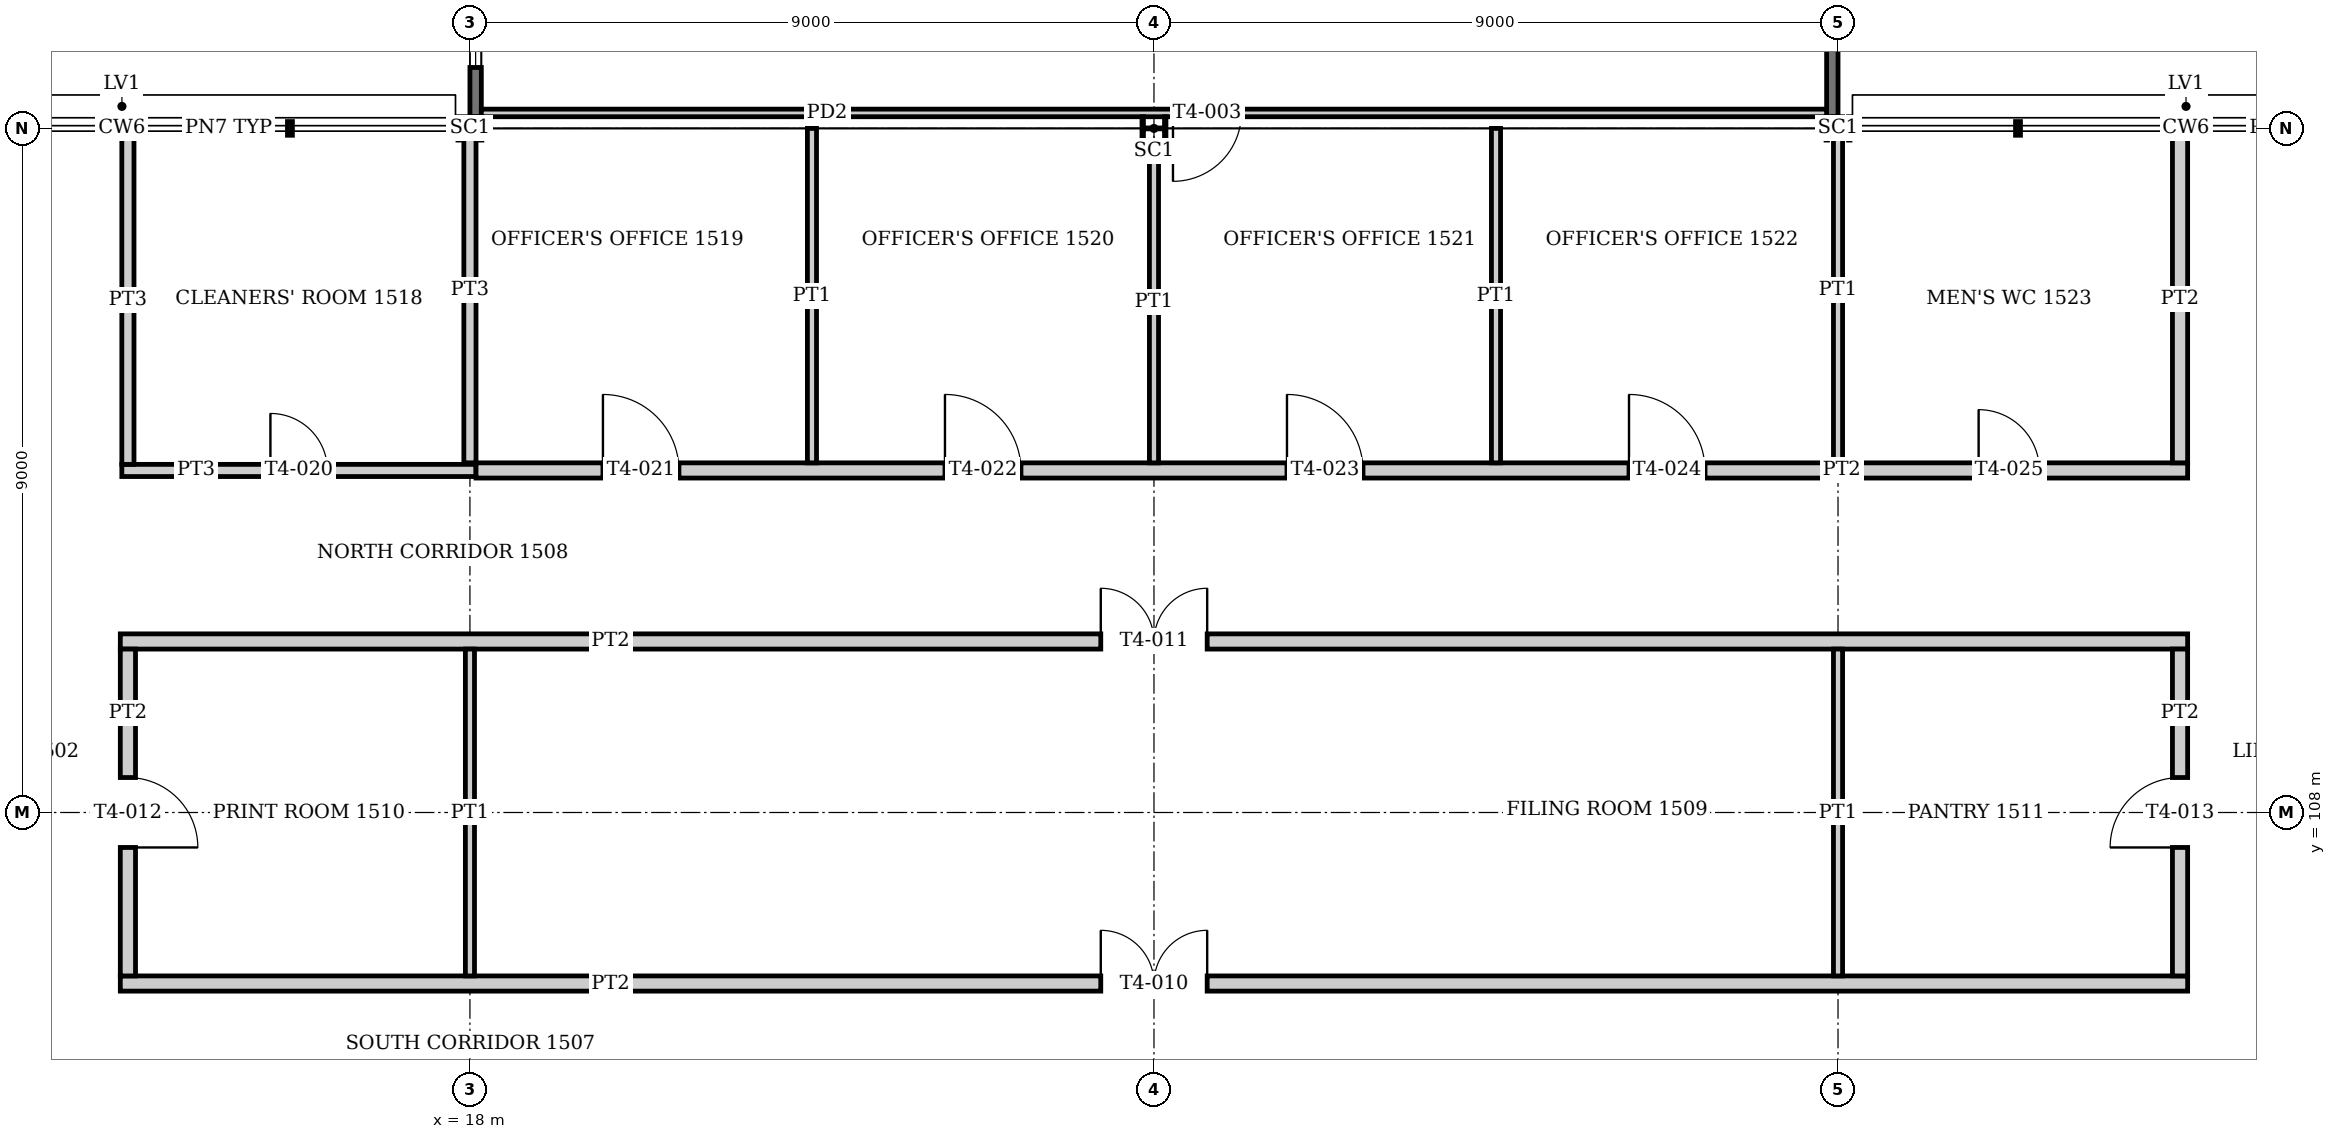
"""IFC4 building model, lengths in metres.
Left out: names, types, materials, properties, quantities, classifications, styles, units other than length and angle.
Written with IfcOpenShell. Run it as: python <this file> out.ifc"""

import sys

from ifc_helpers import new_model, si_unit, direction, frame, frame_2d, origin, origin_2d, place, context, subcontext, project, spatial, rectangle, i_section, extrude, element, fill, save


model = new_model("IFC4")
c1 = context("Model", 3, precision=1e-05, world=origin(), true_north=direction((0.0, 1.0)))
c2 = subcontext(c1, "Body", "Model", "MODEL_VIEW")
j1 = project(units=[si_unit("LENGTHUNIT", "METRE"), si_unit("PLANEANGLEUNIT", "RADIAN")], contexts=[c1])
p1 = place(None, origin())
s1 = spatial("IfcSite", under=j1, at=p1, CompositionType="ELEMENT")
p2 = place(p1, origin())
s2 = spatial("IfcBuilding", under=s1, at=p2, CompositionType="ELEMENT")
p3 = place(p2, frame((0.0, 0.0, 63.2)))
s3 = spatial("IfcBuildingStorey", under=s2, at=p3, CompositionType="ELEMENT", Elevation=63.2)
for number, where, z_axis, x_axis in (
    (1, (18.0, 117.0, 0.0), (0.0, 0.0, 1.0), (0.0, 1.0, 0.0)),
    (2, (27.0, 117.0, 0.0), (0.0, 0.0, 1.0), (0.0, 1.0, 0.0)),
    (3, (36.0, 117.0, 0.0), (0.0, 0.0, 1.0), (0.0, 1.0, 0.0)),
):
    element("IfcColumn", number, at=place(p3, frame(where, z_axis=z_axis, x_axis=x_axis)), inside=s3, PredefinedType="COLUMN", context=c2, shape_type="SweptSolid", body=[
        extrude(i_section(OverallWidth=0.307, OverallDepth=0.315, WebThickness=0.012, FlangeThickness=0.019, at=origin_2d()), origin(), (0.0, 0.0, 1.0), 4.0),
    ])
p4 = place(p3, frame((18.075, 120.45, -0.15), z_axis=(0.0, 0.0, 1.0), x_axis=(0.0, -1.0, 0.0)))
e4 = element("IfcWall", 4, at=p4, inside=s3, PredefinedType="SOLIDWALL", context=c2, shape_type="SweptSolid", body=[
    extrude(rectangle(XDim=3.296, YDim=0.15, at=frame_2d((1.648, 0.0))), origin(), (0.0, 0.0, 1.0), 2.75),
])
p5 = place(p4, frame((0.648, 0.0, 1.05)))
e5 = element("IfcOpeningElement", 5, at=p5, cuts=e4, PredefinedType="OPENING", context=c2, shape_type="SweptSolid", body=[
    extrude(rectangle(XDim=2.0, YDim=1.4, at=frame_2d((1.0, 0.7))), frame((0.0, 0.085, 0.0), z_axis=(0.0, -1.0, 0.0), x_axis=(1.0, 0.0, 0.0)), (0.0, 0.0, 1.0), 0.17),
])
p6 = place(p3, frame((35.925, 120.45, -0.15), z_axis=(0.0, 0.0, 1.0), x_axis=(0.0, -1.0, 0.0)))
e6 = element("IfcWall", 6, at=p6, inside=s3, PredefinedType="SOLIDWALL", context=c2, shape_type="SweptSolid", body=[
    extrude(rectangle(XDim=3.296, YDim=0.15, at=frame_2d((1.648, 0.0))), origin(), (0.0, 0.0, 1.0), 2.75),
])
p7 = place(p3, frame((18.15, 117.204, 0.0), z_axis=(0.0, 0.0, 1.0), x_axis=(1.0, 0.0, 0.0)))
e7 = element("IfcWall", 7, at=p7, inside=s3, PredefinedType="PARTITIONING", context=c2, shape_type="SweptSolid", body=[
    extrude(rectangle(XDim=17.7, YDim=0.1, at=frame_2d((8.85, 0.0))), origin(), (0.0, 0.0, 1.0), 2.6),
])
p8 = place(p7, frame((9.1, 0.0, 0.0)))
e8 = element("IfcOpeningElement", 8, at=p8, cuts=e7, PredefinedType="OPENING", context=c2, shape_type="SweptSolid", body=[
    extrude(rectangle(XDim=0.9, YDim=2.1, at=frame_2d((0.45, 1.05))), frame((0.0, 0.06, 0.0), z_axis=(0.0, -1.0, 0.0), x_axis=(1.0, 0.0, 0.0)), (0.0, 0.0, 1.0), 0.12),
])
p9 = place(p3, frame((13.4, 105.75, 0.0), z_axis=(0.0, 0.0, 1.0), x_axis=(1.0, 0.0, 0.0)))
e9 = element("IfcWall", 9, at=p9, inside=s3, PredefinedType="PARTITIONING", context=c2, shape_type="SweptSolid", body=[
    extrude(rectangle(XDim=27.2, YDim=0.2, at=frame_2d((13.6, 0.0))), origin(), (0.0, 0.0, 1.0), 3.05),
])
p10 = place(p9, frame((12.9, 0.0, 0.0)))
e10 = element("IfcOpeningElement", 10, at=p10, cuts=e9, PredefinedType="OPENING", context=c2, shape_type="SweptSolid", body=[
    extrude(rectangle(XDim=1.4, YDim=2.1, at=frame_2d((0.7, 1.05))), frame((0.0, 0.11, 0.0), z_axis=(0.0, -1.0, 0.0), x_axis=(1.0, 0.0, 0.0)), (0.0, 0.0, 1.0), 0.22),
])
p11 = place(p3, frame((13.4, 110.25, 0.0), z_axis=(0.0, 0.0, 1.0), x_axis=(1.0, 0.0, 0.0)))
e11 = element("IfcWall", 11, at=p11, inside=s3, PredefinedType="PARTITIONING", context=c2, shape_type="SweptSolid", body=[
    extrude(rectangle(XDim=27.2, YDim=0.2, at=frame_2d((13.6, 0.0))), origin(), (0.0, 0.0, 1.0), 3.05),
])
p12 = place(p11, frame((12.9, 0.0, 0.0)))
e12 = element("IfcOpeningElement", 12, at=p12, cuts=e11, PredefinedType="OPENING", context=c2, shape_type="SweptSolid", body=[
    extrude(rectangle(XDim=1.4, YDim=2.1, at=frame_2d((0.7, 1.05))), frame((0.0, 0.11, 0.0), z_axis=(0.0, -1.0, 0.0), x_axis=(1.0, 0.0, 0.0)), (0.0, 0.0, 1.0), 0.22),
])
p13 = place(p3, frame((13.42, 112.5, 0.0), z_axis=(0.0, 0.0, 1.0), x_axis=(1.0, 0.0, 0.0)))
e13 = element("IfcWall", 13, at=p13, inside=s3, PredefinedType="PARTITIONING", context=c2, shape_type="SweptSolid", body=[
    extrude(rectangle(XDim=4.66, YDim=0.16, at=frame_2d((2.33, 0.0))), origin(), (0.0, 0.0, 1.0), 3.05),
])
p14 = place(p13, frame((1.955, 0.0, 0.0)))
e14 = element("IfcOpeningElement", 14, at=p14, cuts=e13, PredefinedType="OPENING", context=c2, shape_type="SweptSolid", body=[
    extrude(rectangle(XDim=0.75, YDim=2.1, at=frame_2d((0.375, 1.05))), frame((0.0, 0.09, 0.0), z_axis=(0.0, -1.0, 0.0), x_axis=(1.0, 0.0, 0.0)), (0.0, 0.0, 1.0), 0.18),
])
p15 = place(p3, frame((18.08, 112.5, 0.0), z_axis=(0.0, 0.0, 1.0), x_axis=(1.0, 0.0, 0.0)))
e15 = element("IfcWall", 15, at=p15, inside=s3, PredefinedType="PARTITIONING", context=c2, shape_type="SweptSolid", body=[
    extrude(rectangle(XDim=22.52, YDim=0.2, at=frame_2d((11.26, 0.0))), origin(), (0.0, 0.0, 1.0), 3.05),
])
p16 = place(p15, frame((1.67, 0.0, 0.0)))
e16 = element("IfcOpeningElement", 16, at=p16, cuts=e15, PredefinedType="OPENING", context=c2, shape_type="SweptSolid", body=[
    extrude(rectangle(XDim=1.0, YDim=2.1, at=frame_2d((0.5, 1.05))), frame((0.0, 0.11, 0.0), z_axis=(0.0, -1.0, 0.0), x_axis=(1.0, 0.0, 0.0)), (0.0, 0.0, 1.0), 0.22),
])
p17 = place(p15, frame((6.17, 0.0, 0.0)))
e17 = element("IfcOpeningElement", 17, at=p17, cuts=e15, PredefinedType="OPENING", context=c2, shape_type="SweptSolid", body=[
    extrude(rectangle(XDim=1.0, YDim=2.1, at=frame_2d((0.5, 1.05))), frame((0.0, 0.11, 0.0), z_axis=(0.0, -1.0, 0.0), x_axis=(1.0, 0.0, 0.0)), (0.0, 0.0, 1.0), 0.22),
])
p18 = place(p15, frame((10.67, 0.0, 0.0)))
e18 = element("IfcOpeningElement", 18, at=p18, cuts=e15, PredefinedType="OPENING", context=c2, shape_type="SweptSolid", body=[
    extrude(rectangle(XDim=1.0, YDim=2.1, at=frame_2d((0.5, 1.05))), frame((0.0, 0.11, 0.0), z_axis=(0.0, -1.0, 0.0), x_axis=(1.0, 0.0, 0.0)), (0.0, 0.0, 1.0), 0.22),
])
p19 = place(p15, frame((15.17, 0.0, 0.0)))
e19 = element("IfcOpeningElement", 19, at=p19, cuts=e15, PredefinedType="OPENING", context=c2, shape_type="SweptSolid", body=[
    extrude(rectangle(XDim=1.0, YDim=2.1, at=frame_2d((0.5, 1.05))), frame((0.0, 0.11, 0.0), z_axis=(0.0, -1.0, 0.0), x_axis=(1.0, 0.0, 0.0)), (0.0, 0.0, 1.0), 0.22),
])
p20 = place(p15, frame((19.77, 0.0, 0.0)))
e20 = element("IfcOpeningElement", 20, at=p20, cuts=e15, PredefinedType="OPENING", context=c2, shape_type="SweptSolid", body=[
    extrude(rectangle(XDim=0.8, YDim=2.1, at=frame_2d((0.4, 1.05))), frame((0.0, 0.11, 0.0), z_axis=(0.0, -1.0, 0.0), x_axis=(1.0, 0.0, 0.0)), (0.0, 0.0, 1.0), 0.22),
])
p21 = place(p3, frame((13.5, 105.85, 0.0), z_axis=(0.0, 0.0, 1.0), x_axis=(0.0, 1.0, 0.0)))
e21 = element("IfcWall", 21, at=p21, inside=s3, PredefinedType="PARTITIONING", context=c2, shape_type="SweptSolid", body=[
    extrude(rectangle(XDim=4.3, YDim=0.2, at=frame_2d((2.15, 0.0))), origin(), (0.0, 0.0, 1.0), 3.05),
])
p22 = place(p21, frame((1.69, 0.0, 0.0)))
e22 = element("IfcOpeningElement", 22, at=p22, cuts=e21, PredefinedType="OPENING", context=c2, shape_type="SweptSolid", body=[
    extrude(rectangle(XDim=0.92, YDim=2.1, at=frame_2d((0.46, 1.05))), frame((0.0, 0.11, 0.0), z_axis=(0.0, -1.0, 0.0), x_axis=(1.0, 0.0, 0.0)), (0.0, 0.0, 1.0), 0.22),
])
p23 = place(p3, frame((13.5, 112.58, 0.0), z_axis=(0.0, 0.0, 1.0), x_axis=(0.0, 1.0, 0.0)))
e23 = element("IfcWall", 23, at=p23, inside=s3, PredefinedType="PARTITIONING", context=c2, shape_type="SweptSolid", body=[
    extrude(rectangle(XDim=4.33, YDim=0.16, at=frame_2d((2.165, 0.0))), origin(), (0.0, 0.0, 1.0), 3.05),
])
p24 = place(p3, frame((18.0, 105.85, 0.0), z_axis=(0.0, 0.0, 1.0), x_axis=(0.0, 1.0, 0.0)))
e24 = element("IfcWall", 24, at=p24, inside=s3, PredefinedType="PARTITIONING", context=c2, shape_type="SweptSolid", body=[
    extrude(rectangle(XDim=4.3, YDim=0.12, at=frame_2d((2.15, 0.0))), origin(), (0.0, 0.0, 1.0), 3.05),
])
p25 = place(p3, frame((18.0, 112.6, 0.0), z_axis=(0.0, 0.0, 1.0), x_axis=(0.0, 1.0, 0.0)))
e25 = element("IfcWall", 25, at=p25, inside=s3, PredefinedType="PARTITIONING", context=c2, shape_type="SweptSolid", body=[
    extrude(rectangle(XDim=4.553, YDim=0.16, at=frame_2d((2.277, 0.0))), origin(), (0.0, 0.0, 1.0), 3.05),
])
p26 = place(p3, frame((22.5, 112.6, 0.0), z_axis=(0.0, 0.0, 1.0), x_axis=(0.0, 1.0, 0.0)))
e26 = element("IfcWall", 26, at=p26, inside=s3, PredefinedType="PARTITIONING", context=c2, shape_type="SweptSolid", body=[
    extrude(rectangle(XDim=4.4, YDim=0.12, at=frame_2d((2.2, 0.0))), origin(), (0.0, 0.0, 1.0), 3.05),
])
p27 = place(p3, frame((27.0, 112.6, 0.0), z_axis=(0.0, 0.0, 1.0), x_axis=(0.0, 1.0, 0.0)))
e27 = element("IfcWall", 27, at=p27, inside=s3, PredefinedType="PARTITIONING", context=c2, shape_type="SweptSolid", body=[
    extrude(rectangle(XDim=4.242, YDim=0.12, at=frame_2d((2.121, 0.0))), origin(), (0.0, 0.0, 1.0), 3.05),
])
p28 = place(p3, frame((31.5, 112.6, 0.0), z_axis=(0.0, 0.0, 1.0), x_axis=(0.0, 1.0, 0.0)))
e28 = element("IfcWall", 28, at=p28, inside=s3, PredefinedType="PARTITIONING", context=c2, shape_type="SweptSolid", body=[
    extrude(rectangle(XDim=4.4, YDim=0.12, at=frame_2d((2.2, 0.0))), origin(), (0.0, 0.0, 1.0), 3.05),
])
p29 = place(p3, frame((36.0, 105.85, 0.0), z_axis=(0.0, 0.0, 1.0), x_axis=(0.0, 1.0, 0.0)))
e29 = element("IfcWall", 29, at=p29, inside=s3, PredefinedType="PARTITIONING", context=c2, shape_type="SweptSolid", body=[
    extrude(rectangle(XDim=4.3, YDim=0.12, at=frame_2d((2.15, 0.0))), origin(), (0.0, 0.0, 1.0), 3.05),
])
p30 = place(p3, frame((36.0, 112.6, 0.0), z_axis=(0.0, 0.0, 1.0), x_axis=(0.0, 1.0, 0.0)))
e30 = element("IfcWall", 30, at=p30, inside=s3, PredefinedType="PARTITIONING", context=c2, shape_type="SweptSolid", body=[
    extrude(rectangle(XDim=4.553, YDim=0.12, at=frame_2d((2.277, 0.0))), origin(), (0.0, 0.0, 1.0), 3.05),
])
p31 = place(p3, frame((40.5, 105.85, 0.0), z_axis=(0.0, 0.0, 1.0), x_axis=(0.0, 1.0, 0.0)))
e31 = element("IfcWall", 31, at=p31, inside=s3, PredefinedType="PARTITIONING", context=c2, shape_type="SweptSolid", body=[
    extrude(rectangle(XDim=4.3, YDim=0.2, at=frame_2d((2.15, 0.0))), origin(), (0.0, 0.0, 1.0), 3.05),
])
p32 = place(p31, frame((1.69, 0.0, 0.0)))
e32 = element("IfcOpeningElement", 32, at=p32, cuts=e31, PredefinedType="OPENING", context=c2, shape_type="SweptSolid", body=[
    extrude(rectangle(XDim=0.92, YDim=2.1, at=frame_2d((0.46, 1.05))), frame((0.0, 0.11, 0.0), z_axis=(0.0, -1.0, 0.0), x_axis=(1.0, 0.0, 0.0)), (0.0, 0.0, 1.0), 0.22),
])
p33 = place(p3, frame((40.5, 112.6, 0.0), z_axis=(0.0, 0.0, 1.0), x_axis=(0.0, 1.0, 0.0)))
e33 = element("IfcWall", 33, at=p33, inside=s3, PredefinedType="PARTITIONING", context=c2, shape_type="SweptSolid", body=[
    extrude(rectangle(XDim=4.31, YDim=0.2, at=frame_2d((2.155, 0.0))), origin(), (0.0, 0.0, 1.0), 3.05),
])
p34 = place(p5, origin())
e34 = element("IfcWindow", 34, at=p34, inside=s3, PartitioningType="SINGLE_PANEL", PredefinedType="WINDOW", context=c2, shape_type="SweptSolid", body=[
    extrude(rectangle(XDim=2.0, YDim=1.4, at=frame_2d((1.0, 0.7))), frame((0.0, 0.03, 0.0), z_axis=(0.0, -1.0, 0.0), x_axis=(1.0, 0.0, 0.0)), (0.0, 0.0, 1.0), 0.06),
])
fill(e5, e34)
p35 = place(p8, frame((0.9, 0.0, 0.0), z_axis=(0.0, 0.0, 1.0), x_axis=(-1.0, 0.0, 0.0)))
e35 = element("IfcDoor", 35, at=p35, inside=s3, OperationType="SINGLE_SWING_RIGHT", PredefinedType="DOOR", context=c2, shape_type="SweptSolid", body=[
    extrude(rectangle(XDim=0.9, YDim=2.1, at=frame_2d((0.45, 1.05))), frame((0.0, 0.025, 0.0), z_axis=(0.0, -1.0, 0.0), x_axis=(1.0, 0.0, 0.0)), (0.0, 0.0, 1.0), 0.05),
])
fill(e8, e35)
p36 = place(p10, origin())
e36 = element("IfcDoor", 36, at=p36, inside=s3, OperationType="DOUBLE_DOOR_SINGLE_SWING", PredefinedType="DOOR", context=c2, shape_type="SweptSolid", body=[
    extrude(rectangle(XDim=1.4, YDim=2.1, at=frame_2d((0.7, 1.05))), frame((0.0, 0.025, 0.0), z_axis=(0.0, -1.0, 0.0), x_axis=(1.0, 0.0, 0.0)), (0.0, 0.0, 1.0), 0.05),
])
fill(e10, e36)
p37 = place(p12, origin())
e37 = element("IfcDoor", 37, at=p37, inside=s3, OperationType="DOUBLE_DOOR_SINGLE_SWING", PredefinedType="DOOR", context=c2, shape_type="SweptSolid", body=[
    extrude(rectangle(XDim=1.4, YDim=2.1, at=frame_2d((0.7, 1.05))), frame((0.0, 0.025, 0.0), z_axis=(0.0, -1.0, 0.0), x_axis=(1.0, 0.0, 0.0)), (0.0, 0.0, 1.0), 0.05),
])
fill(e12, e37)
p38 = place(p22, frame((0.92, 0.0, 0.0), z_axis=(0.0, 0.0, 1.0), x_axis=(-1.0, 0.0, 0.0)))
e38 = element("IfcDoor", 38, at=p38, inside=s3, OperationType="SINGLE_SWING_RIGHT", PredefinedType="DOOR", context=c2, shape_type="SweptSolid", body=[
    extrude(rectangle(XDim=0.92, YDim=2.1, at=frame_2d((0.46, 1.05))), frame((0.0, 0.025, 0.0), z_axis=(0.0, -1.0, 0.0), x_axis=(1.0, 0.0, 0.0)), (0.0, 0.0, 1.0), 0.05),
])
fill(e22, e38)
p39 = place(p32, origin())
e39 = element("IfcDoor", 39, at=p39, inside=s3, OperationType="SINGLE_SWING_LEFT", PredefinedType="DOOR", context=c2, shape_type="SweptSolid", body=[
    extrude(rectangle(XDim=0.92, YDim=2.1, at=frame_2d((0.46, 1.05))), frame((0.0, 0.025, 0.0), z_axis=(0.0, -1.0, 0.0), x_axis=(1.0, 0.0, 0.0)), (0.0, 0.0, 1.0), 0.05),
])
fill(e32, e39)
p40 = place(p14, origin())
e40 = element("IfcDoor", 40, at=p40, inside=s3, OperationType="SINGLE_SWING_LEFT", PredefinedType="DOOR", context=c2, shape_type="SweptSolid", body=[
    extrude(rectangle(XDim=0.75, YDim=2.1, at=frame_2d((0.375, 1.05))), frame((0.0, 0.025, 0.0), z_axis=(0.0, -1.0, 0.0), x_axis=(1.0, 0.0, 0.0)), (0.0, 0.0, 1.0), 0.05),
])
fill(e14, e40)
p41 = place(p16, origin())
e41 = element("IfcDoor", 41, at=p41, inside=s3, OperationType="SINGLE_SWING_LEFT", PredefinedType="DOOR", context=c2, shape_type="SweptSolid", body=[
    extrude(rectangle(XDim=1.0, YDim=2.1, at=frame_2d((0.5, 1.05))), frame((0.0, 0.025, 0.0), z_axis=(0.0, -1.0, 0.0), x_axis=(1.0, 0.0, 0.0)), (0.0, 0.0, 1.0), 0.05),
])
fill(e16, e41)
p42 = place(p17, origin())
e42 = element("IfcDoor", 42, at=p42, inside=s3, OperationType="SINGLE_SWING_LEFT", PredefinedType="DOOR", context=c2, shape_type="SweptSolid", body=[
    extrude(rectangle(XDim=1.0, YDim=2.1, at=frame_2d((0.5, 1.05))), frame((0.0, 0.025, 0.0), z_axis=(0.0, -1.0, 0.0), x_axis=(1.0, 0.0, 0.0)), (0.0, 0.0, 1.0), 0.05),
])
fill(e17, e42)
p43 = place(p18, origin())
e43 = element("IfcDoor", 43, at=p43, inside=s3, OperationType="SINGLE_SWING_LEFT", PredefinedType="DOOR", context=c2, shape_type="SweptSolid", body=[
    extrude(rectangle(XDim=1.0, YDim=2.1, at=frame_2d((0.5, 1.05))), frame((0.0, 0.025, 0.0), z_axis=(0.0, -1.0, 0.0), x_axis=(1.0, 0.0, 0.0)), (0.0, 0.0, 1.0), 0.05),
])
fill(e18, e43)
p44 = place(p19, origin())
e44 = element("IfcDoor", 44, at=p44, inside=s3, OperationType="SINGLE_SWING_LEFT", PredefinedType="DOOR", context=c2, shape_type="SweptSolid", body=[
    extrude(rectangle(XDim=1.0, YDim=2.1, at=frame_2d((0.5, 1.05))), frame((0.0, 0.025, 0.0), z_axis=(0.0, -1.0, 0.0), x_axis=(1.0, 0.0, 0.0)), (0.0, 0.0, 1.0), 0.05),
])
fill(e19, e44)
p45 = place(p20, origin())
e45 = element("IfcDoor", 45, at=p45, inside=s3, OperationType="SINGLE_SWING_LEFT", PredefinedType="DOOR", context=c2, shape_type="SweptSolid", body=[
    extrude(rectangle(XDim=0.8, YDim=2.1, at=frame_2d((0.4, 1.05))), frame((0.0, 0.025, 0.0), z_axis=(0.0, -1.0, 0.0), x_axis=(1.0, 0.0, 0.0)), (0.0, 0.0, 1.0), 0.05),
])
fill(e20, e45)
save(model, sys.argv[1])
